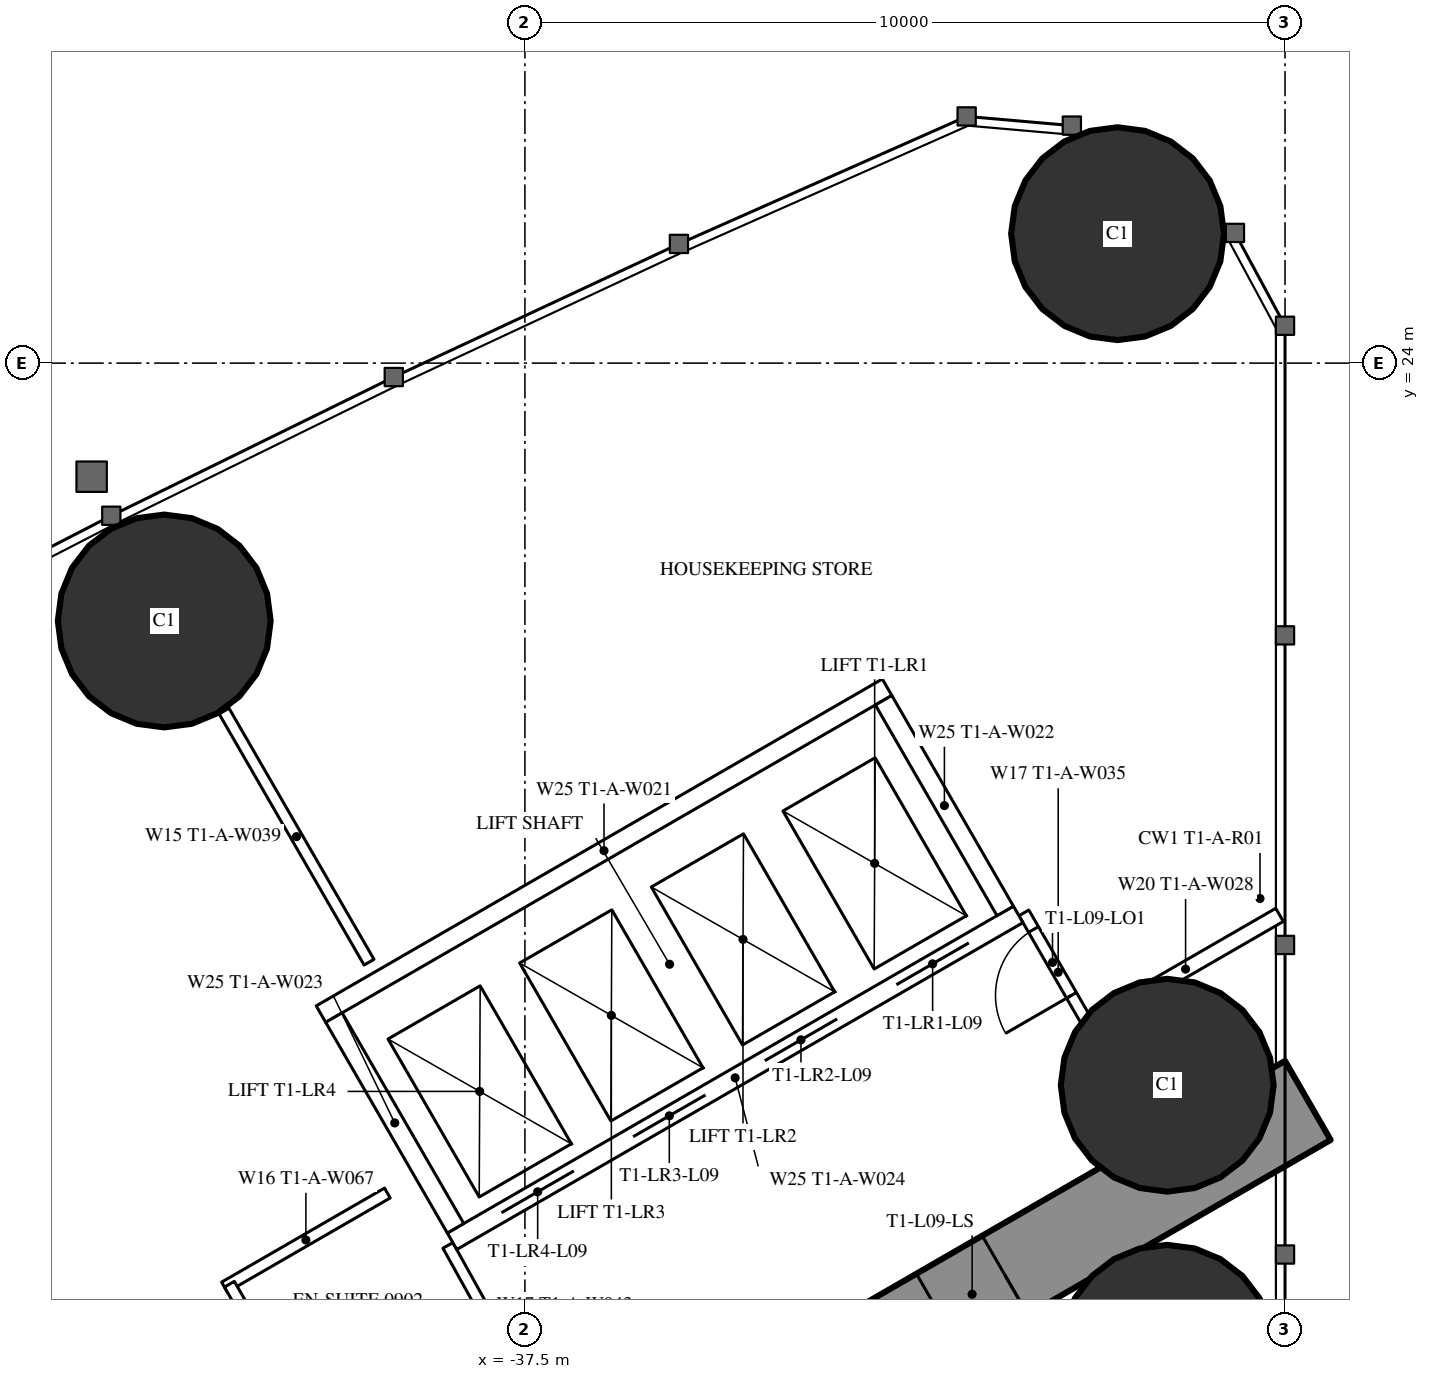
"""IFC4 building model, lengths in metres.
Left out: names, types, materials, properties, quantities, classifications, styles, units other than length and angle.
Written with IfcOpenShell. Run it as: python <this file> out.ifc"""

import sys

from ifc_helpers import new_model, si_unit, direction, frame, frame_2d, origin, origin_2d, place, context, subcontext, project, spatial, rectangle, hollow_circle, extrude, element, fill, save


model = new_model("IFC4")
c1 = context("Model", 3, precision=1e-05, world=origin(), true_north=direction((0.0, 1.0)))
c2 = subcontext(c1, "Body", "Model", "MODEL_VIEW")
j1 = project(units=[si_unit("LENGTHUNIT", "METRE"), si_unit("PLANEANGLEUNIT", "RADIAN")], contexts=[c1])
p1 = place(None, origin())
s1 = spatial("IfcSite", under=j1, at=p1, CompositionType="ELEMENT")
p2 = place(p1, origin())
s2 = spatial("IfcBuilding", under=s1, at=p2, CompositionType="ELEMENT")
p3 = place(p2, frame((0.0, 0.0, 39.0)))
s3 = spatial("IfcBuildingStorey", under=s2, at=p3, CompositionType="ELEMENT", Elevation=39.0)
for number, where, z_axis, x_axis in (
    (1, (-29.703, 25.703, 0.0), (0.0, 0.0, 1.0), (1.0, 0.0, 0.0)),
    (2, (-29.05, 11.0, 0.0), (0.0, 0.0, 1.0), (1.0, 0.0, 0.0)),
    (3, (-29.05, 14.5, 0.0), (0.0, 0.0, 1.0), (1.0, 0.0, 0.0)),
    (4, (-42.245, 20.607, 0.0), (0.0, 0.0, 1.0), (1.0, 0.0, 0.0)),
):
    element("IfcColumn", number, at=place(p3, frame(where, z_axis=z_axis, x_axis=x_axis)), inside=s3, PredefinedType="COLUMN", context=c2, shape_type="SweptSolid", body=[
        extrude(hollow_circle(Radius=1.4, WallThickness=0.12, at=origin_2d()), origin(), (0.0, 0.0, 1.0), 3.5),
    ])
p4 = place(p3, frame((-27.2, 14.3, 0.0), z_axis=(0.0, 0.0, 1.0), x_axis=(-0.866026593062, -0.499997940104, 0.0)))
e5 = element("IfcWall", 5, at=p4, inside=s3, PredefinedType="SHEAR", context=c2, shape_type="SweptSolid", body=[
    extrude(rectangle(XDim=28.946, YDim=1.2, at=frame_2d((14.473, 0.0))), origin(), (0.0, 0.0, 1.0), 3.5),
])
p5 = place(p4, frame((4.6, 0.0, 0.0)))
e6 = element("IfcOpeningElement", 6, at=p5, cuts=e5, PredefinedType="OPENING", context=c2, shape_type="SweptSolid", body=[
    extrude(rectangle(XDim=1.0, YDim=2.2, at=frame_2d((0.5, 1.1))), frame((0.0, 0.61, 0.0), z_axis=(0.0, -1.0, 0.0), x_axis=(1.0, 0.0, 0.0)), (0.0, 0.0, 1.0), 1.22),
])
p6 = place(p4, frame((13.395, 0.0, 0.0)))
e7 = element("IfcOpeningElement", 7, at=p6, cuts=e5, PredefinedType="OPENING", context=c2, shape_type="SweptSolid", body=[
    extrude(rectangle(XDim=1.8, YDim=2.2, at=frame_2d((0.9, 1.1))), frame((0.0, 0.61, 0.0), z_axis=(0.0, -1.0, 0.0), x_axis=(1.0, 0.0, 0.0)), (0.0, 0.0, 1.0), 1.22),
])
p7 = place(p3, frame((-39.551, 16.119, 0.0), z_axis=(0.0, 0.0, 1.0), x_axis=(-0.500014214979, 0.866017196607, 0.0)))
e8 = element("IfcWall", 8, at=p7, inside=s3, PredefinedType="PARTITIONING", context=c2, shape_type="SweptSolid", body=[
    extrude(rectangle(XDim=3.815, YDim=0.15, at=frame_2d((1.907, 0.0))), origin(), (0.0, 0.0, 1.0), 3.25),
])
p8 = place(p3, frame((-27.572, 16.741, 0.0), z_axis=(0.0, 0.0, 1.0), x_axis=(-0.866034618596, -0.499984039138, 0.0)))
e9 = element("IfcWall", 9, at=p8, inside=s3, PredefinedType="PARTITIONING", context=c2, shape_type="SweptSolid", body=[
    extrude(rectangle(XDim=2.854, YDim=0.2, at=frame_2d((1.427, 0.0))), origin(), (0.0, 0.0, 1.0), 3.25),
])
p9 = place(p3, frame((-38.513, 12.392, 0.0), z_axis=(0.0, 0.0, 1.0), x_axis=(0.485585508183, -0.874189175317, 0.0)))
e10 = element("IfcWall", 10, at=p9, inside=s3, PredefinedType="PARTITIONING", context=c2, shape_type="SweptSolid", body=[
    extrude(rectangle(XDim=1.805, YDim=0.15, at=frame_2d((0.902, 0.0))), origin(), (0.0, 0.0, 1.0), 3.25),
])
p10 = place(p3, frame((-30.033, 15.205, 0.0), z_axis=(0.0, 0.0, 1.0), x_axis=(-0.499980071345, 0.866036909293, 0.0)))
e11 = element("IfcWall", 11, at=p10, inside=s3, PredefinedType="PARTITIONING", context=c2, shape_type="SweptSolid", body=[
    extrude(rectangle(XDim=1.805, YDim=0.15, at=frame_2d((0.902, 0.0))), origin(), (0.0, 0.0, 1.0), 3.25),
])
p11 = place(p10, frame((0.552, 0.0, 0.0)))
e12 = element("IfcOpeningElement", 12, at=p11, cuts=e11, PredefinedType="OPENING", context=c2, shape_type="SweptSolid", body=[
    extrude(rectangle(XDim=1.0, YDim=2.2, at=frame_2d((0.5, 1.1))), frame((0.0, 0.085, 0.0), z_axis=(0.0, -1.0, 0.0), x_axis=(1.0, 0.0, 0.0)), (0.0, 0.0, 1.0), 0.17),
])
p12 = place(p3, frame((-39.31, 13.082, 0.0), z_axis=(0.0, 0.0, 1.0), x_axis=(-0.866031185235, -0.4999899861, 0.0)))
e13 = element("IfcWall", 13, at=p12, inside=s3, PredefinedType="PARTITIONING", context=c2, shape_type="SweptSolid", body=[
    extrude(rectangle(XDim=2.475, YDim=0.15, at=frame_2d((1.238, 0.0))), origin(), (0.0, 0.0, 1.0), 3.25),
])
p13 = place(p3, frame((-40.088, 9.63, 0.0), z_axis=(0.0, 0.0, 1.0), x_axis=(-0.500006934395, 0.866021400173, 0.0)))
e14 = element("IfcWall", 14, at=p13, inside=s3, PredefinedType="PARTITIONING", context=c2, shape_type="SweptSolid", body=[
    extrude(rectangle(XDim=2.6, YDim=0.15, at=frame_2d((1.3, 0.0))), origin(), (0.0, 0.0, 1.0), 3.25),
])
p14 = place(p13, frame((0.9, 0.0, 0.0)))
e15 = element("IfcOpeningElement", 15, at=p14, cuts=e14, PredefinedType="OPENING", context=c2, shape_type="SweptSolid", body=[
    extrude(rectangle(XDim=0.8, YDim=2.2, at=frame_2d((0.4, 1.1))), frame((0.0, 0.085, 0.0), z_axis=(0.0, -1.0, 0.0), x_axis=(1.0, 0.0, 0.0)), (0.0, 0.0, 1.0), 0.17),
])
p15 = place(p3, frame((-31.01, 16.747, 0.0), z_axis=(0.0, 0.0, 1.0), x_axis=(-0.866028165386, -0.499995216735, 0.0)))
e16 = element("IfcWall", 16, at=p15, inside=s3, PredefinedType="PARTITIONING", context=c2, shape_type="SweptSolid", body=[
    extrude(rectangle(XDim=8.6, YDim=0.25, at=frame_2d((4.3, 0.0))), origin(), (0.0, 0.0, 1.0), 3.25),
])
p16 = place(p15, frame((0.75, 0.0, 0.0)))
e17 = element("IfcOpeningElement", 17, at=p16, cuts=e16, PredefinedType="OPENING", context=c2, shape_type="SweptSolid", body=[
    extrude(rectangle(XDim=1.1, YDim=2.2, at=frame_2d((0.55, 1.1))), frame((0.0, 0.135, 0.0), z_axis=(0.0, -1.0, 0.0), x_axis=(1.0, 0.0, 0.0)), (0.0, 0.0, 1.0), 0.27),
])
p17 = place(p15, frame((2.75, 0.0, 0.0)))
e18 = element("IfcOpeningElement", 18, at=p17, cuts=e16, PredefinedType="OPENING", context=c2, shape_type="SweptSolid", body=[
    extrude(rectangle(XDim=1.1, YDim=2.2, at=frame_2d((0.55, 1.1))), frame((0.0, 0.135, 0.0), z_axis=(0.0, -1.0, 0.0), x_axis=(1.0, 0.0, 0.0)), (0.0, 0.0, 1.0), 0.27),
])
p18 = place(p15, frame((4.75, 0.0, 0.0)))
e19 = element("IfcOpeningElement", 19, at=p18, cuts=e16, PredefinedType="OPENING", context=c2, shape_type="SweptSolid", body=[
    extrude(rectangle(XDim=1.1, YDim=2.2, at=frame_2d((0.55, 1.1))), frame((0.0, 0.135, 0.0), z_axis=(0.0, -1.0, 0.0), x_axis=(1.0, 0.0, 0.0)), (0.0, 0.0, 1.0), 0.27),
])
p19 = place(p15, frame((6.75, 0.0, 0.0)))
e20 = element("IfcOpeningElement", 20, at=p19, cuts=e16, PredefinedType="OPENING", context=c2, shape_type="SweptSolid", body=[
    extrude(rectangle(XDim=1.1, YDim=2.2, at=frame_2d((0.55, 1.1))), frame((0.0, 0.135, 0.0), z_axis=(0.0, -1.0, 0.0), x_axis=(1.0, 0.0, 0.0)), (0.0, 0.0, 1.0), 0.27),
])
p20 = place(p3, frame((-32.736, 19.736, 0.0), z_axis=(0.0, 0.0, 1.0), x_axis=(-0.866028165386, -0.499995216735, 0.0)))
e21 = element("IfcWall", 21, at=p20, inside=s3, PredefinedType="PARTITIONING", context=c2, shape_type="SweptSolid", body=[
    extrude(rectangle(XDim=8.6, YDim=0.25, at=frame_2d((4.3, 0.0))), origin(), (0.0, 0.0, 1.0), 3.25),
])
p21 = place(p3, frame((-31.181, 16.793, 0.0), z_axis=(0.0, 0.0, 1.0), x_axis=(-0.499929347863, 0.866066190972, 0.0)))
e22 = element("IfcWall", 22, at=p21, inside=s3, PredefinedType="PARTITIONING", context=c2, shape_type="SweptSolid", body=[
    extrude(rectangle(XDim=3.201, YDim=0.25, at=frame_2d((1.6, 0.0))), origin(), (0.0, 0.0, 1.0), 3.25),
])
p22 = place(p3, frame((-38.413, 12.618, 0.0), z_axis=(0.0, 0.0, 1.0), x_axis=(-0.499872130319, 0.866099216793, 0.0)))
e23 = element("IfcWall", 23, at=p22, inside=s3, PredefinedType="PARTITIONING", context=c2, shape_type="SweptSolid", body=[
    extrude(rectangle(XDim=3.2, YDim=0.25, at=frame_2d((1.6, 0.0))), origin(), (0.0, 0.0, 1.0), 3.25),
])
p23 = place(p11, origin())
e24 = element("IfcDoor", 24, at=p23, inside=s3, OperationType="SINGLE_SWING_LEFT", PredefinedType="DOOR", context=c2, shape_type="SweptSolid", body=[
    extrude(rectangle(XDim=1.0, YDim=2.2, at=frame_2d((0.5, 1.1))), frame((0.0, 0.025, 0.0), z_axis=(0.0, -1.0, 0.0), x_axis=(1.0, 0.0, 0.0)), (0.0, 0.0, 1.0), 0.05),
])
fill(e12, e24)
p24 = place(p5, origin())
e25 = element("IfcDoor", 25, at=p24, inside=s3, OperationType="SINGLE_SWING_LEFT", PredefinedType="DOOR", context=c2, shape_type="SweptSolid", body=[
    extrude(rectangle(XDim=1.0, YDim=2.2, at=frame_2d((0.5, 1.1))), frame((0.0, 0.025, 0.0), z_axis=(0.0, -1.0, 0.0), x_axis=(1.0, 0.0, 0.0)), (0.0, 0.0, 1.0), 0.05),
])
fill(e6, e25)
p25 = place(p16, origin())
e26 = element("IfcDoor", 26, at=p25, inside=s3, OperationType="DOUBLE_DOOR_SLIDING", PredefinedType="USERDEFINED", context=c2, shape_type="SweptSolid", body=[
    extrude(rectangle(XDim=1.1, YDim=2.2, at=frame_2d((0.55, 1.1))), frame((0.0, 0.025, 0.0), z_axis=(0.0, -1.0, 0.0), x_axis=(1.0, 0.0, 0.0)), (0.0, 0.0, 1.0), 0.05),
])
fill(e17, e26)
p26 = place(p17, origin())
e27 = element("IfcDoor", 27, at=p26, inside=s3, OperationType="DOUBLE_DOOR_SLIDING", PredefinedType="USERDEFINED", context=c2, shape_type="SweptSolid", body=[
    extrude(rectangle(XDim=1.1, YDim=2.2, at=frame_2d((0.55, 1.1))), frame((0.0, 0.025, 0.0), z_axis=(0.0, -1.0, 0.0), x_axis=(1.0, 0.0, 0.0)), (0.0, 0.0, 1.0), 0.05),
])
fill(e18, e27)
p27 = place(p18, origin())
e28 = element("IfcDoor", 28, at=p27, inside=s3, OperationType="DOUBLE_DOOR_SLIDING", PredefinedType="USERDEFINED", context=c2, shape_type="SweptSolid", body=[
    extrude(rectangle(XDim=1.1, YDim=2.2, at=frame_2d((0.55, 1.1))), frame((0.0, 0.025, 0.0), z_axis=(0.0, -1.0, 0.0), x_axis=(1.0, 0.0, 0.0)), (0.0, 0.0, 1.0), 0.05),
])
fill(e19, e28)
p28 = place(p19, origin())
e29 = element("IfcDoor", 29, at=p28, inside=s3, OperationType="DOUBLE_DOOR_SLIDING", PredefinedType="USERDEFINED", context=c2, shape_type="SweptSolid", body=[
    extrude(rectangle(XDim=1.1, YDim=2.2, at=frame_2d((0.55, 1.1))), frame((0.0, 0.025, 0.0), z_axis=(0.0, -1.0, 0.0), x_axis=(1.0, 0.0, 0.0)), (0.0, 0.0, 1.0), 0.05),
])
fill(e20, e29)
save(model, sys.argv[1])
